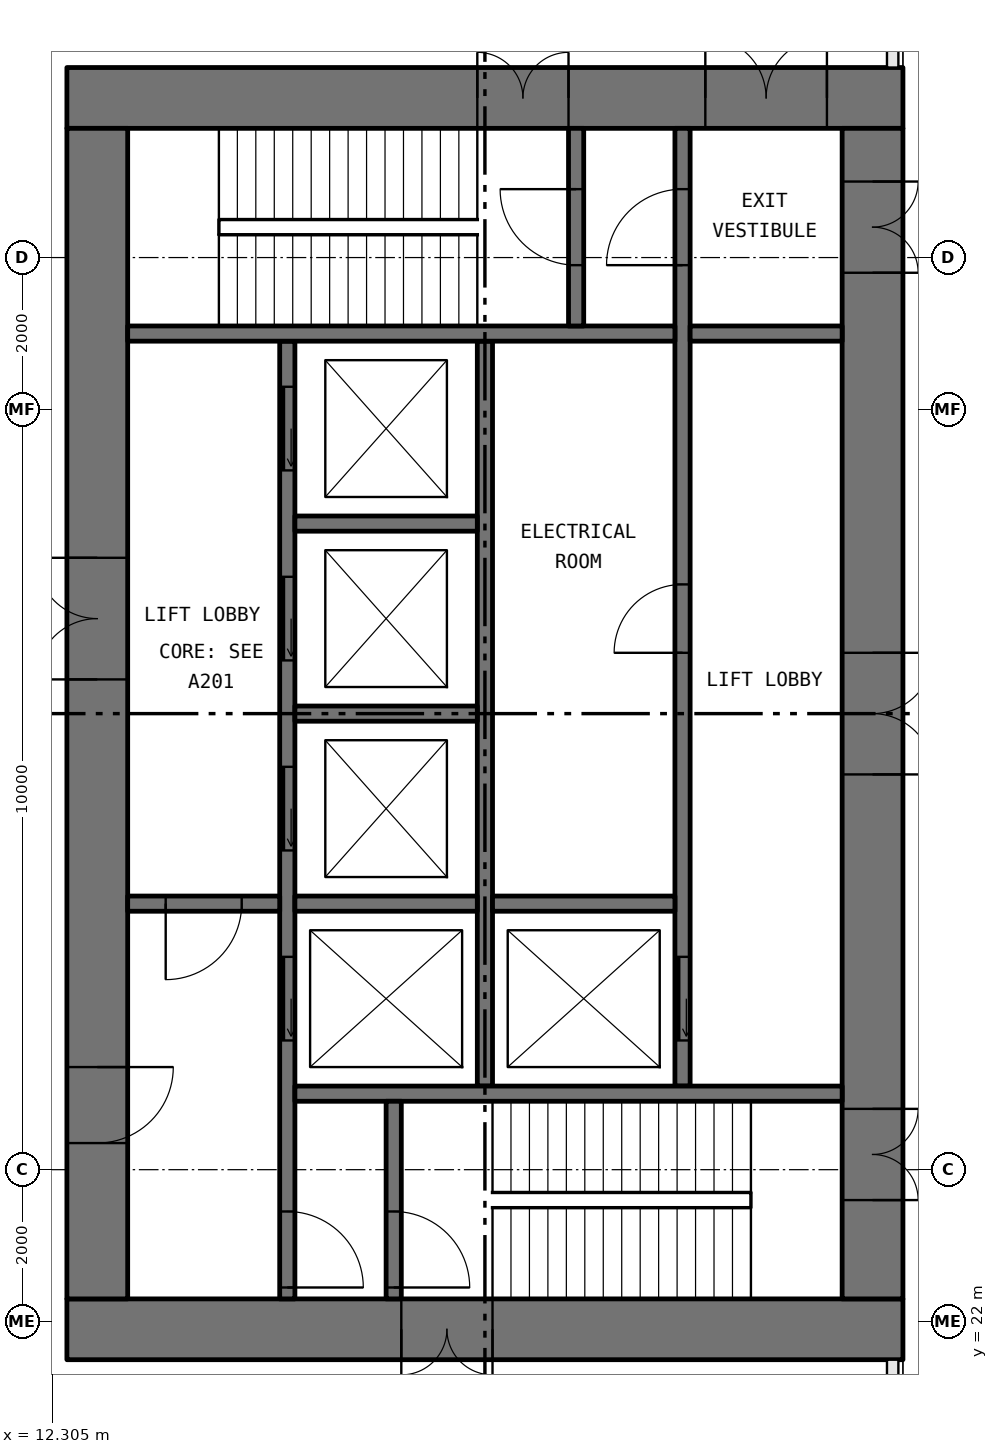
"""IFC4 building model, lengths in metres.
Left out: names, types, materials, properties, quantities, classifications, styles, units other than length and angle.
Written with IfcOpenShell. Run it as: python <this file> out.ifc"""

import sys

from ifc_helpers import new_model, si_unit, direction, frame, frame_2d, origin, place, context, subcontext, project, spatial, rectangle, extrude, element, fill, save


model = new_model("IFC4")
c1 = context("Model", 3, precision=1e-05, world=origin(), true_north=direction((0.0, 1.0)))
c2 = subcontext(c1, "Body", "Model", "MODEL_VIEW")
j1 = project(units=[si_unit("LENGTHUNIT", "METRE"), si_unit("PLANEANGLEUNIT", "RADIAN")], contexts=[c1])
p1 = place(None, origin())
s1 = spatial("IfcSite", under=j1, at=p1, CompositionType="ELEMENT")
p2 = place(p1, origin())
s2 = spatial("IfcBuilding", under=s1, at=p2, CompositionType="ELEMENT")
p3 = place(p2, origin())
s3 = spatial("IfcBuildingStorey", under=s2, at=p3, CompositionType="ELEMENT", Elevation=0.0)
p4 = place(p3, frame((12.5, 21.9, 0.0), z_axis=(0.0, 0.0, 1.0), x_axis=(1.0, 0.0, 0.0)))
e1 = element("IfcWall", 1, at=p4, inside=s3, PredefinedType="SHEAR", context=c2, shape_type="SweptSolid", body=[
    extrude(rectangle(XDim=11.0, YDim=0.8, at=frame_2d((5.5, 0.0))), origin(), (0.0, 0.0, 1.0), 5.6),
])
p5 = place(p4, frame((4.4, 0.0, 0.0)))
e2 = element("IfcOpeningElement", 2, at=p5, cuts=e1, PredefinedType="OPENING", context=c2, shape_type="SweptSolid", body=[
    extrude(rectangle(XDim=1.2, YDim=2.1, at=frame_2d((0.6, 1.05))), frame((0.0, 0.41, 0.0), z_axis=(0.0, -1.0, 0.0), x_axis=(1.0, 0.0, 0.0)), (0.0, 0.0, 1.0), 0.82),
])
p6 = place(p3, frame((12.5, 38.1, 0.0), z_axis=(0.0, 0.0, 1.0), x_axis=(1.0, 0.0, 0.0)))
e3 = element("IfcWall", 3, at=p6, inside=s3, PredefinedType="SHEAR", context=c2, shape_type="SweptSolid", body=[
    extrude(rectangle(XDim=11.0, YDim=0.8, at=frame_2d((5.5, 0.0))), origin(), (0.0, 0.0, 1.0), 5.6),
])
p7 = place(p6, frame((8.4, 0.0, 0.0)))
e4 = element("IfcOpeningElement", 4, at=p7, cuts=e3, PredefinedType="OPENING", context=c2, shape_type="SweptSolid", body=[
    extrude(rectangle(XDim=1.6, YDim=2.1, at=frame_2d((0.8, 1.05))), frame((0.0, 0.41, 0.0), z_axis=(0.0, -1.0, 0.0), x_axis=(1.0, 0.0, 0.0)), (0.0, 0.0, 1.0), 0.82),
])
p8 = place(p6, frame((5.4, 0.0, 0.0)))
e5 = element("IfcOpeningElement", 5, at=p8, cuts=e3, PredefinedType="OPENING", context=c2, shape_type="SweptSolid", body=[
    extrude(rectangle(XDim=1.2, YDim=2.1, at=frame_2d((0.6, 1.05))), frame((0.0, 0.41, 0.0), z_axis=(0.0, -1.0, 0.0), x_axis=(1.0, 0.0, 0.0)), (0.0, 0.0, 1.0), 0.82),
])
p9 = place(p3, frame((12.9, 22.3, 0.0), z_axis=(0.0, 0.0, 1.0), x_axis=(0.0, 1.0, 0.0)))
e6 = element("IfcWall", 6, at=p9, inside=s3, PredefinedType="SHEAR", context=c2, shape_type="SweptSolid", body=[
    extrude(rectangle(XDim=15.4, YDim=0.8, at=frame_2d((7.7, 0.0))), origin(), (0.0, 0.0, 1.0), 5.6),
])
p10 = place(p9, frame((8.15, 0.0, 0.0)))
e7 = element("IfcOpeningElement", 7, at=p10, cuts=e6, PredefinedType="OPENING", context=c2, shape_type="SweptSolid", body=[
    extrude(rectangle(XDim=1.6, YDim=2.1, at=frame_2d((0.8, 1.05))), frame((0.0, 0.41, 0.0), z_axis=(0.0, -1.0, 0.0), x_axis=(1.0, 0.0, 0.0)), (0.0, 0.0, 1.0), 0.82),
])
p11 = place(p9, frame((2.05, 0.0, 0.0)))
e8 = element("IfcOpeningElement", 8, at=p11, cuts=e6, PredefinedType="OPENING", context=c2, shape_type="SweptSolid", body=[
    extrude(rectangle(XDim=1.0, YDim=2.1, at=frame_2d((0.5, 1.05))), frame((0.0, 0.41, 0.0), z_axis=(0.0, -1.0, 0.0), x_axis=(1.0, 0.0, 0.0)), (0.0, 0.0, 1.0), 0.82),
])
p12 = place(p3, frame((23.1, 22.3, 0.0), z_axis=(0.0, 0.0, 1.0), x_axis=(0.0, 1.0, 0.0)))
e9 = element("IfcWall", 9, at=p12, inside=s3, PredefinedType="SHEAR", context=c2, shape_type="SweptSolid", body=[
    extrude(rectangle(XDim=15.4, YDim=0.8, at=frame_2d((7.7, 0.0))), origin(), (0.0, 0.0, 1.0), 5.6),
])
p13 = place(p12, frame((6.9, 0.0, 0.0)))
e10 = element("IfcOpeningElement", 10, at=p13, cuts=e9, PredefinedType="OPENING", context=c2, shape_type="SweptSolid", body=[
    extrude(rectangle(XDim=1.6, YDim=2.1, at=frame_2d((0.8, 1.05))), frame((0.0, 0.41, 0.0), z_axis=(0.0, -1.0, 0.0), x_axis=(1.0, 0.0, 0.0)), (0.0, 0.0, 1.0), 0.82),
])
p14 = place(p12, frame((1.3, 0.0, 0.0)))
e11 = element("IfcOpeningElement", 11, at=p14, cuts=e9, PredefinedType="OPENING", context=c2, shape_type="SweptSolid", body=[
    extrude(rectangle(XDim=1.2, YDim=2.1, at=frame_2d((0.6, 1.05))), frame((0.0, 0.41, 0.0), z_axis=(0.0, -1.0, 0.0), x_axis=(1.0, 0.0, 0.0)), (0.0, 0.0, 1.0), 0.82),
])
p15 = place(p12, frame((13.5, 0.0, 0.0)))
e12 = element("IfcOpeningElement", 12, at=p15, cuts=e9, PredefinedType="OPENING", context=c2, shape_type="SweptSolid", body=[
    extrude(rectangle(XDim=1.2, YDim=2.1, at=frame_2d((0.6, 1.05))), frame((0.0, 0.41, 0.0), z_axis=(0.0, -1.0, 0.0), x_axis=(1.0, 0.0, 0.0)), (0.0, 0.0, 1.0), 0.82),
])
p16 = place(p3, frame((15.4, 22.3, 0.0), z_axis=(0.0, 0.0, 1.0), x_axis=(0.0, 1.0, 0.0)))
e13 = element("IfcWall", 13, at=p16, inside=s3, PredefinedType="SOLIDWALL", context=c2, shape_type="SweptSolid", body=[
    extrude(rectangle(XDim=12.6, YDim=0.2, at=frame_2d((6.3, 0.0))), origin(), (0.0, 0.0, 1.0), 5.6),
])
p17 = place(p16, frame((3.4, 0.0, 0.0)))
e14 = element("IfcOpeningElement", 14, at=p17, cuts=e13, PredefinedType="OPENING", context=c2, shape_type="SweptSolid", body=[
    extrude(rectangle(XDim=1.1, YDim=2.1, at=frame_2d((0.55, 1.05))), frame((0.0, 0.11, 0.0), z_axis=(0.0, -1.0, 0.0), x_axis=(1.0, 0.0, 0.0)), (0.0, 0.0, 1.0), 0.22),
])
p18 = place(p16, frame((5.9, 0.0, 0.0)))
e15 = element("IfcOpeningElement", 15, at=p18, cuts=e13, PredefinedType="OPENING", context=c2, shape_type="SweptSolid", body=[
    extrude(rectangle(XDim=1.1, YDim=2.1, at=frame_2d((0.55, 1.05))), frame((0.0, 0.11, 0.0), z_axis=(0.0, -1.0, 0.0), x_axis=(1.0, 0.0, 0.0)), (0.0, 0.0, 1.0), 0.22),
])
p19 = place(p16, frame((8.4, 0.0, 0.0)))
e16 = element("IfcOpeningElement", 16, at=p19, cuts=e13, PredefinedType="OPENING", context=c2, shape_type="SweptSolid", body=[
    extrude(rectangle(XDim=1.1, YDim=2.1, at=frame_2d((0.55, 1.05))), frame((0.0, 0.11, 0.0), z_axis=(0.0, -1.0, 0.0), x_axis=(1.0, 0.0, 0.0)), (0.0, 0.0, 1.0), 0.22),
])
p20 = place(p16, frame((10.9, 0.0, 0.0)))
e17 = element("IfcOpeningElement", 17, at=p20, cuts=e13, PredefinedType="OPENING", context=c2, shape_type="SweptSolid", body=[
    extrude(rectangle(XDim=1.1, YDim=2.1, at=frame_2d((0.55, 1.05))), frame((0.0, 0.11, 0.0), z_axis=(0.0, -1.0, 0.0), x_axis=(1.0, 0.0, 0.0)), (0.0, 0.0, 1.0), 0.22),
])
p21 = place(p16, frame((0.15, 0.0, 0.0)))
e18 = element("IfcOpeningElement", 18, at=p21, cuts=e13, PredefinedType="OPENING", context=c2, shape_type="SweptSolid", body=[
    extrude(rectangle(XDim=1.0, YDim=2.1, at=frame_2d((0.5, 1.05))), frame((0.0, 0.11, 0.0), z_axis=(0.0, -1.0, 0.0), x_axis=(1.0, 0.0, 0.0)), (0.0, 0.0, 1.0), 0.22),
])
p22 = place(p3, frame((20.6, 25.1, 0.0), z_axis=(0.0, 0.0, 1.0), x_axis=(0.0, 1.0, 0.0)))
e19 = element("IfcWall", 19, at=p22, inside=s3, PredefinedType="SOLIDWALL", context=c2, shape_type="SweptSolid", body=[
    extrude(rectangle(XDim=12.6, YDim=0.2, at=frame_2d((6.3, 0.0))), origin(), (0.0, 0.0, 1.0), 5.6),
])
p23 = place(p22, frame((0.6, 0.0, 0.0)))
e20 = element("IfcOpeningElement", 20, at=p23, cuts=e19, PredefinedType="OPENING", context=c2, shape_type="SweptSolid", body=[
    extrude(rectangle(XDim=1.1, YDim=2.1, at=frame_2d((0.55, 1.05))), frame((0.0, 0.11, 0.0), z_axis=(0.0, -1.0, 0.0), x_axis=(1.0, 0.0, 0.0)), (0.0, 0.0, 1.0), 0.22),
])
p24 = place(p22, frame((10.8, 0.0, 0.0)))
e21 = element("IfcOpeningElement", 21, at=p24, cuts=e19, PredefinedType="OPENING", context=c2, shape_type="SweptSolid", body=[
    extrude(rectangle(XDim=1.0, YDim=2.1, at=frame_2d((0.5, 1.05))), frame((0.0, 0.11, 0.0), z_axis=(0.0, -1.0, 0.0), x_axis=(1.0, 0.0, 0.0)), (0.0, 0.0, 1.0), 0.22),
])
p25 = place(p22, frame((5.7, 0.0, 0.0)))
e22 = element("IfcOpeningElement", 22, at=p25, cuts=e19, PredefinedType="OPENING", context=c2, shape_type="SweptSolid", body=[
    extrude(rectangle(XDim=0.9, YDim=2.1, at=frame_2d((0.45, 1.05))), frame((0.0, 0.11, 0.0), z_axis=(0.0, -1.0, 0.0), x_axis=(1.0, 0.0, 0.0)), (0.0, 0.0, 1.0), 0.22),
])
p26 = place(p3, frame((18.0, 25.1, 0.0), z_axis=(0.0, 0.0, 1.0), x_axis=(0.0, 1.0, 0.0)))
e23 = element("IfcWall", 23, at=p26, inside=s3, PredefinedType="SOLIDWALL", context=c2, shape_type="SweptSolid", body=[
    extrude(rectangle(XDim=9.8, YDim=0.2, at=frame_2d((4.9, 0.0))), origin(), (0.0, 0.0, 1.0), 5.6),
])
for number, where, z_axis, x_axis in (
    (24, (15.5, 25.0, 0.0), (0.0, 0.0, 1.0), (1.0, 0.0, 0.0)),
    (25, (13.3, 35.0, 0.0), (0.0, 0.0, 1.0), (1.0, 0.0, 0.0)),
):
    element("IfcWall", number, at=place(p3, frame(where, z_axis=z_axis, x_axis=x_axis)), inside=s3, PredefinedType="SOLIDWALL", context=c2, shape_type="SweptSolid", body=[
        extrude(rectangle(XDim=7.2, YDim=0.2, at=frame_2d((3.6, 0.0))), origin(), (0.0, 0.0, 1.0), 5.6),
    ])
p27 = place(p3, frame((13.3, 27.5, 0.0), z_axis=(0.0, 0.0, 1.0), x_axis=(1.0, 0.0, 0.0)))
e26 = element("IfcWall", 26, at=p27, inside=s3, PredefinedType="SOLIDWALL", context=c2, shape_type="SweptSolid", body=[
    extrude(rectangle(XDim=2.0, YDim=0.2, at=frame_2d((1.0, 0.0))), origin(), (0.0, 0.0, 1.0), 5.6),
])
p28 = place(p27, frame((0.5, 0.0, 0.0)))
e27 = element("IfcOpeningElement", 27, at=p28, cuts=e26, PredefinedType="OPENING", context=c2, shape_type="SweptSolid", body=[
    extrude(rectangle(XDim=1.0, YDim=2.1, at=frame_2d((0.5, 1.05))), frame((0.0, 0.11, 0.0), z_axis=(0.0, -1.0, 0.0), x_axis=(1.0, 0.0, 0.0)), (0.0, 0.0, 1.0), 0.22),
])
p29 = place(p3, frame((16.8, 22.3, 0.0), z_axis=(0.0, 0.0, 1.0), x_axis=(0.0, 1.0, 0.0)))
e28 = element("IfcWall", 28, at=p29, inside=s3, PredefinedType="SOLIDWALL", context=c2, shape_type="SweptSolid", body=[
    extrude(rectangle(XDim=2.6, YDim=0.2, at=frame_2d((1.3, 0.0))), origin(), (0.0, 0.0, 1.0), 5.6),
])
p30 = place(p29, frame((0.15, 0.0, 0.0)))
e29 = element("IfcOpeningElement", 29, at=p30, cuts=e28, PredefinedType="OPENING", context=c2, shape_type="SweptSolid", body=[
    extrude(rectangle(XDim=1.0, YDim=2.1, at=frame_2d((0.5, 1.05))), frame((0.0, 0.11, 0.0), z_axis=(0.0, -1.0, 0.0), x_axis=(1.0, 0.0, 0.0)), (0.0, 0.0, 1.0), 0.22),
])
p31 = place(p3, frame((19.2, 35.1, 0.0), z_axis=(0.0, 0.0, 1.0), x_axis=(0.0, 1.0, 0.0)))
e30 = element("IfcWall", 30, at=p31, inside=s3, PredefinedType="SOLIDWALL", context=c2, shape_type="SweptSolid", body=[
    extrude(rectangle(XDim=2.6, YDim=0.2, at=frame_2d((1.3, 0.0))), origin(), (0.0, 0.0, 1.0), 5.6),
])
p32 = place(p31, frame((0.8, 0.0, 0.0)))
e31 = element("IfcOpeningElement", 31, at=p32, cuts=e30, PredefinedType="OPENING", context=c2, shape_type="SweptSolid", body=[
    extrude(rectangle(XDim=1.0, YDim=2.1, at=frame_2d((0.5, 1.05))), frame((0.0, 0.11, 0.0), z_axis=(0.0, -1.0, 0.0), x_axis=(1.0, 0.0, 0.0)), (0.0, 0.0, 1.0), 0.22),
])
p33 = place(p3, frame((20.7, 35.0, 0.0), z_axis=(0.0, 0.0, 1.0), x_axis=(1.0, 0.0, 0.0)))
e32 = element("IfcWall", 32, at=p33, inside=s3, PredefinedType="SOLIDWALL", context=c2, shape_type="SweptSolid", body=[
    extrude(rectangle(XDim=2.0, YDim=0.2, at=frame_2d((1.0, 0.0))), origin(), (0.0, 0.0, 1.0), 5.6),
])
for number, where, z_axis, x_axis in (
    (33, (15.5, 27.5, 0.0), (0.0, 0.0, 1.0), (1.0, 0.0, 0.0)),
    (34, (15.5, 30.0, 0.0), (0.0, 0.0, 1.0), (1.0, 0.0, 0.0)),
    (35, (15.5, 32.5, 0.0), (0.0, 0.0, 1.0), (1.0, 0.0, 0.0)),
    (36, (18.1, 27.5, 0.0), (0.0, 0.0, 1.0), (1.0, 0.0, 0.0)),
):
    element("IfcWall", number, at=place(p3, frame(where, z_axis=z_axis, x_axis=x_axis)), inside=s3, PredefinedType="SOLIDWALL", context=c2, shape_type="SweptSolid", body=[
        extrude(rectangle(XDim=2.4, YDim=0.2, at=frame_2d((1.2, 0.0))), origin(), (0.0, 0.0, 1.0), 5.6),
    ])
p34 = place(p23, origin())
e37 = element("IfcDoor", 37, at=p34, inside=s3, OperationType="SLIDING_TO_LEFT", PredefinedType="DOOR", context=c2, shape_type="SweptSolid", body=[
    extrude(rectangle(XDim=1.1, YDim=2.1, at=frame_2d((0.55, 1.05))), frame((0.0, 0.025, 0.0), z_axis=(0.0, -1.0, 0.0), x_axis=(1.0, 0.0, 0.0)), (0.0, 0.0, 1.0), 0.05),
])
fill(e20, e37)
p35 = place(p17, origin())
e38 = element("IfcDoor", 38, at=p35, inside=s3, OperationType="SLIDING_TO_LEFT", PredefinedType="DOOR", context=c2, shape_type="SweptSolid", body=[
    extrude(rectangle(XDim=1.1, YDim=2.1, at=frame_2d((0.55, 1.05))), frame((0.0, 0.025, 0.0), z_axis=(0.0, -1.0, 0.0), x_axis=(1.0, 0.0, 0.0)), (0.0, 0.0, 1.0), 0.05),
])
fill(e14, e38)
p36 = place(p18, origin())
e39 = element("IfcDoor", 39, at=p36, inside=s3, OperationType="SLIDING_TO_LEFT", PredefinedType="DOOR", context=c2, shape_type="SweptSolid", body=[
    extrude(rectangle(XDim=1.1, YDim=2.1, at=frame_2d((0.55, 1.05))), frame((0.0, 0.025, 0.0), z_axis=(0.0, -1.0, 0.0), x_axis=(1.0, 0.0, 0.0)), (0.0, 0.0, 1.0), 0.05),
])
fill(e15, e39)
p37 = place(p19, origin())
e40 = element("IfcDoor", 40, at=p37, inside=s3, OperationType="SLIDING_TO_LEFT", PredefinedType="DOOR", context=c2, shape_type="SweptSolid", body=[
    extrude(rectangle(XDim=1.1, YDim=2.1, at=frame_2d((0.55, 1.05))), frame((0.0, 0.025, 0.0), z_axis=(0.0, -1.0, 0.0), x_axis=(1.0, 0.0, 0.0)), (0.0, 0.0, 1.0), 0.05),
])
fill(e16, e40)
p38 = place(p20, origin())
e41 = element("IfcDoor", 41, at=p38, inside=s3, OperationType="SLIDING_TO_LEFT", PredefinedType="DOOR", context=c2, shape_type="SweptSolid", body=[
    extrude(rectangle(XDim=1.1, YDim=2.1, at=frame_2d((0.55, 1.05))), frame((0.0, 0.025, 0.0), z_axis=(0.0, -1.0, 0.0), x_axis=(1.0, 0.0, 0.0)), (0.0, 0.0, 1.0), 0.05),
])
fill(e17, e41)
p39 = place(p30, frame((1.0, 0.0, 0.0), x_axis=(-1.0, 0.0, 0.0)))
e42 = element("IfcDoor", 42, at=p39, inside=s3, OperationType="SINGLE_SWING_LEFT", PredefinedType="DOOR", context=c2, shape_type="SweptSolid", body=[
    extrude(rectangle(XDim=1.0, YDim=2.1, at=frame_2d((0.5, 1.05))), frame((0.0, 0.025, 0.0), z_axis=(0.0, -1.0, 0.0), x_axis=(1.0, 0.0, 0.0)), (0.0, 0.0, 1.0), 0.05),
])
fill(e29, e42)
p40 = place(p21, frame((1.0, 0.0, 0.0), x_axis=(-1.0, 0.0, 0.0)))
e43 = element("IfcDoor", 43, at=p40, inside=s3, OperationType="SINGLE_SWING_LEFT", PredefinedType="DOOR", context=c2, shape_type="SweptSolid", body=[
    extrude(rectangle(XDim=1.0, YDim=2.1, at=frame_2d((0.5, 1.05))), frame((0.0, 0.025, 0.0), z_axis=(0.0, -1.0, 0.0), x_axis=(1.0, 0.0, 0.0)), (0.0, 0.0, 1.0), 0.05),
])
fill(e18, e43)
p41 = place(p24, origin())
e44 = element("IfcDoor", 44, at=p41, inside=s3, OperationType="SINGLE_SWING_RIGHT", PredefinedType="DOOR", context=c2, shape_type="SweptSolid", body=[
    extrude(rectangle(XDim=1.0, YDim=2.1, at=frame_2d((0.5, 1.05))), frame((0.0, 0.025, 0.0), z_axis=(0.0, -1.0, 0.0), x_axis=(1.0, 0.0, 0.0)), (0.0, 0.0, 1.0), 0.05),
])
fill(e21, e44)
p42 = place(p32, origin())
e45 = element("IfcDoor", 45, at=p42, inside=s3, OperationType="SINGLE_SWING_LEFT", PredefinedType="DOOR", context=c2, shape_type="SweptSolid", body=[
    extrude(rectangle(XDim=1.0, YDim=2.1, at=frame_2d((0.5, 1.05))), frame((0.0, 0.025, 0.0), z_axis=(0.0, -1.0, 0.0), x_axis=(1.0, 0.0, 0.0)), (0.0, 0.0, 1.0), 0.05),
])
fill(e31, e45)
p43 = place(p28, frame((1.0, 0.0, 0.0), x_axis=(-1.0, 0.0, 0.0)))
e46 = element("IfcDoor", 46, at=p43, inside=s3, OperationType="SINGLE_SWING_LEFT", PredefinedType="DOOR", context=c2, shape_type="SweptSolid", body=[
    extrude(rectangle(XDim=1.0, YDim=2.1, at=frame_2d((0.5, 1.05))), frame((0.0, 0.025, 0.0), z_axis=(0.0, -1.0, 0.0), x_axis=(1.0, 0.0, 0.0)), (0.0, 0.0, 1.0), 0.05),
])
fill(e27, e46)
p44 = place(p10, origin())
e47 = element("IfcDoor", 47, at=p44, inside=s3, OperationType="DOUBLE_DOOR_SINGLE_SWING", PredefinedType="DOOR", context=c2, shape_type="SweptSolid", body=[
    extrude(rectangle(XDim=1.6, YDim=2.1, at=frame_2d((0.8, 1.05))), frame((0.0, 0.025, 0.0), z_axis=(0.0, -1.0, 0.0), x_axis=(1.0, 0.0, 0.0)), (0.0, 0.0, 1.0), 0.05),
])
fill(e7, e47)
p45 = place(p11, frame((1.0, 0.0, 0.0), x_axis=(-1.0, 0.0, 0.0)))
e48 = element("IfcDoor", 48, at=p45, inside=s3, OperationType="SINGLE_SWING_RIGHT", PredefinedType="DOOR", context=c2, shape_type="SweptSolid", body=[
    extrude(rectangle(XDim=1.0, YDim=2.1, at=frame_2d((0.5, 1.05))), frame((0.0, 0.025, 0.0), z_axis=(0.0, -1.0, 0.0), x_axis=(1.0, 0.0, 0.0)), (0.0, 0.0, 1.0), 0.05),
])
fill(e8, e48)
p46 = place(p7, origin())
e49 = element("IfcDoor", 49, at=p46, inside=s3, OperationType="DOUBLE_DOOR_SINGLE_SWING", PredefinedType="DOOR", context=c2, shape_type="SweptSolid", body=[
    extrude(rectangle(XDim=1.6, YDim=2.1, at=frame_2d((0.8, 1.05))), frame((0.0, 0.025, 0.0), z_axis=(0.0, -1.0, 0.0), x_axis=(1.0, 0.0, 0.0)), (0.0, 0.0, 1.0), 0.05),
])
fill(e4, e49)
p47 = place(p13, frame((1.6, 0.0, 0.0), x_axis=(-1.0, 0.0, 0.0)))
e50 = element("IfcDoor", 50, at=p47, inside=s3, OperationType="DOUBLE_DOOR_SINGLE_SWING", PredefinedType="DOOR", context=c2, shape_type="SweptSolid", body=[
    extrude(rectangle(XDim=1.6, YDim=2.1, at=frame_2d((0.8, 1.05))), frame((0.0, 0.025, 0.0), z_axis=(0.0, -1.0, 0.0), x_axis=(1.0, 0.0, 0.0)), (0.0, 0.0, 1.0), 0.05),
])
fill(e10, e50)
p48 = place(p5, frame((1.2, 0.0, 0.0), x_axis=(-1.0, 0.0, 0.0)))
e51 = element("IfcDoor", 51, at=p48, inside=s3, OperationType="DOUBLE_DOOR_SINGLE_SWING", PredefinedType="DOOR", context=c2, shape_type="SweptSolid", body=[
    extrude(rectangle(XDim=1.2, YDim=2.1, at=frame_2d((0.6, 1.05))), frame((0.0, 0.025, 0.0), z_axis=(0.0, -1.0, 0.0), x_axis=(1.0, 0.0, 0.0)), (0.0, 0.0, 1.0), 0.05),
])
fill(e2, e51)
p49 = place(p8, origin())
e52 = element("IfcDoor", 52, at=p49, inside=s3, OperationType="DOUBLE_DOOR_SINGLE_SWING", PredefinedType="DOOR", context=c2, shape_type="SweptSolid", body=[
    extrude(rectangle(XDim=1.2, YDim=2.1, at=frame_2d((0.6, 1.05))), frame((0.0, 0.025, 0.0), z_axis=(0.0, -1.0, 0.0), x_axis=(1.0, 0.0, 0.0)), (0.0, 0.0, 1.0), 0.05),
])
fill(e5, e52)
p50 = place(p14, frame((1.2, 0.0, 0.0), x_axis=(-1.0, 0.0, 0.0)))
e53 = element("IfcDoor", 53, at=p50, inside=s3, OperationType="DOUBLE_DOOR_SINGLE_SWING", PredefinedType="DOOR", context=c2, shape_type="SweptSolid", body=[
    extrude(rectangle(XDim=1.2, YDim=2.1, at=frame_2d((0.6, 1.05))), frame((0.0, 0.025, 0.0), z_axis=(0.0, -1.0, 0.0), x_axis=(1.0, 0.0, 0.0)), (0.0, 0.0, 1.0), 0.05),
])
fill(e11, e53)
p51 = place(p15, frame((1.2, 0.0, 0.0), x_axis=(-1.0, 0.0, 0.0)))
e54 = element("IfcDoor", 54, at=p51, inside=s3, OperationType="DOUBLE_DOOR_SINGLE_SWING", PredefinedType="DOOR", context=c2, shape_type="SweptSolid", body=[
    extrude(rectangle(XDim=1.2, YDim=2.1, at=frame_2d((0.6, 1.05))), frame((0.0, 0.025, 0.0), z_axis=(0.0, -1.0, 0.0), x_axis=(1.0, 0.0, 0.0)), (0.0, 0.0, 1.0), 0.05),
])
fill(e12, e54)
p52 = place(p25, origin())
e55 = element("IfcDoor", 55, at=p52, inside=s3, OperationType="SINGLE_SWING_RIGHT", PredefinedType="DOOR", context=c2, shape_type="SweptSolid", body=[
    extrude(rectangle(XDim=0.9, YDim=2.1, at=frame_2d((0.45, 1.05))), frame((0.0, 0.025, 0.0), z_axis=(0.0, -1.0, 0.0), x_axis=(1.0, 0.0, 0.0)), (0.0, 0.0, 1.0), 0.05),
])
fill(e22, e55)
save(model, sys.argv[1])
